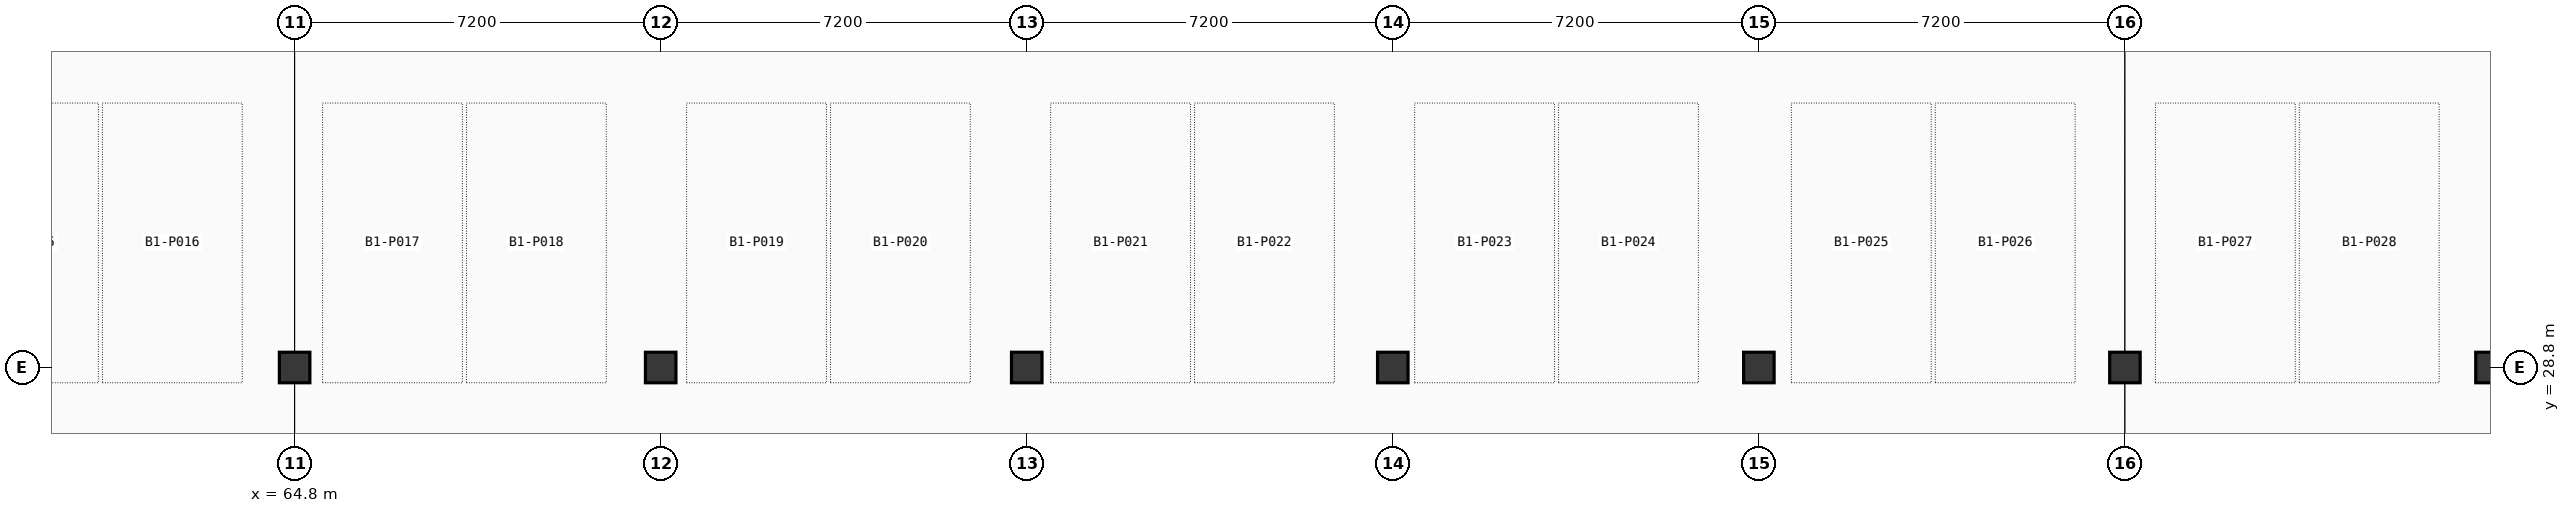
"""IFC4 building model, lengths in metres.
Left out: names, types, materials, properties, quantities, classifications, styles, units other than length and angle.
Written with IfcOpenShell. Run it as: python <this file> out.ifc"""

import sys

from ifc_helpers import new_model, si_unit, direction, frame, origin, origin_2d, place, context, subcontext, project, spatial, rectangle, extrude, element, save


model = new_model("IFC4")
c1 = context("Model", 3, precision=1e-05, world=origin(), true_north=direction((0.0, 1.0)))
c2 = subcontext(c1, "Body", "Model", "MODEL_VIEW")
j1 = project(units=[si_unit("LENGTHUNIT", "METRE"), si_unit("PLANEANGLEUNIT", "RADIAN")], contexts=[c1])
p1 = place(None, origin())
s1 = spatial("IfcSite", under=j1, at=p1, CompositionType="ELEMENT")
p2 = place(p1, origin())
s2 = spatial("IfcBuilding", under=s1, at=p2, CompositionType="ELEMENT")
p3 = place(p2, frame((0.0, 0.0, -4.2)))
s3 = spatial("IfcBuildingStorey", under=s2, at=p3, CompositionType="ELEMENT", Elevation=-4.2)
for number, where, z_axis, x_axis in (
    (1, (64.8, 28.8, 0.0), (0.0, 0.0, 1.0), (1.0, 0.0, 0.0)),
    (2, (72.0, 28.8, 0.0), (0.0, 0.0, 1.0), (1.0, 0.0, 0.0)),
    (3, (79.2, 28.8, 0.0), (0.0, 0.0, 1.0), (1.0, 0.0, 0.0)),
    (4, (86.4, 28.8, 0.0), (0.0, 0.0, 1.0), (1.0, 0.0, 0.0)),
    (5, (93.6, 28.8, 0.0), (0.0, 0.0, 1.0), (1.0, 0.0, 0.0)),
    (6, (100.8, 28.8, 0.0), (0.0, 0.0, 1.0), (1.0, 0.0, 0.0)),
    (7, (108.0, 28.8, 0.0), (0.0, 0.0, 1.0), (1.0, 0.0, 0.0)),
):
    element("IfcColumn", number, at=place(p3, frame(where, z_axis=z_axis, x_axis=x_axis)), inside=s3, PredefinedType="COLUMN", context=c2, shape_type="SweptSolid", body=[
        extrude(rectangle(XDim=0.6, YDim=0.6, at=origin_2d()), origin(), (0.0, 0.0, 1.0), 4.2),
    ])
save(model, sys.argv[1])
